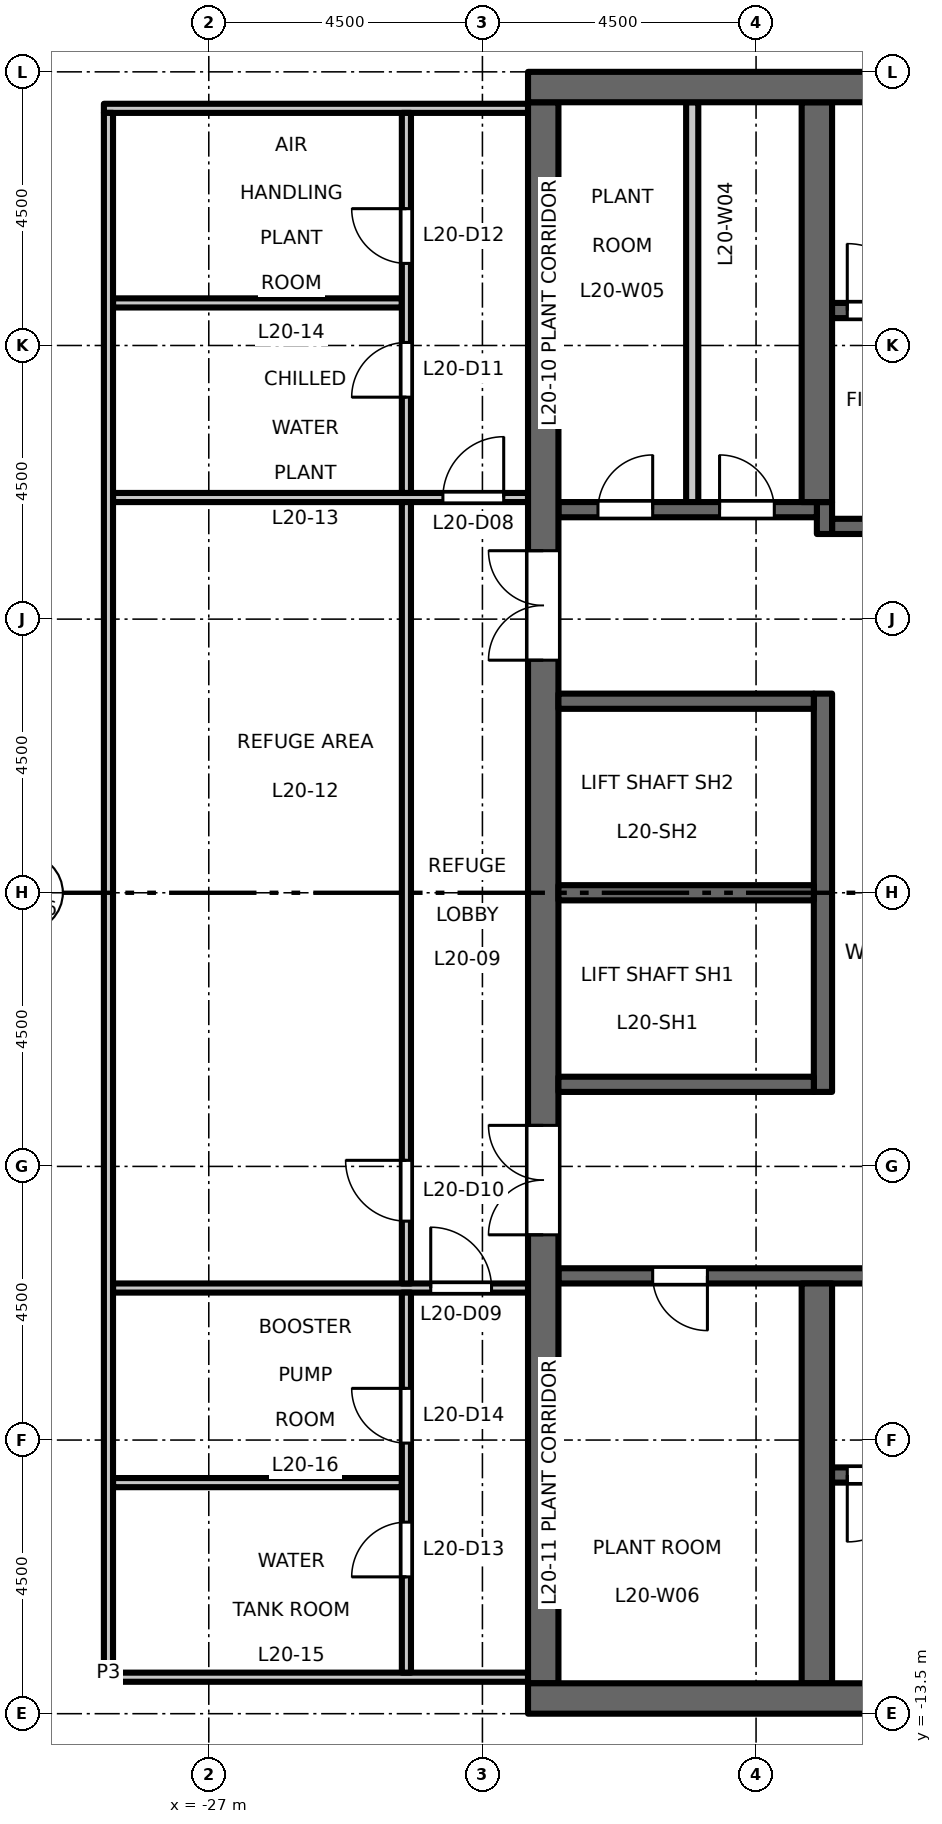
"""IFC4 building model, lengths in metres.
Left out: names, types, materials, properties, quantities, classifications, styles, units other than length and angle.
Written with IfcOpenShell. Run it as: python <this file> out.ifc"""

import sys

from ifc_helpers import new_model, si_unit, direction, frame, frame_2d, origin, place, context, subcontext, project, spatial, rectangle, extrude, element, fill, save


model = new_model("IFC4")
c1 = context("Model", 3, precision=1e-05, world=origin(), true_north=direction((0.0, 1.0)))
c2 = subcontext(c1, "Body", "Model", "MODEL_VIEW")
j1 = project(units=[si_unit("LENGTHUNIT", "METRE"), si_unit("PLANEANGLEUNIT", "RADIAN")], contexts=[c1])
p1 = place(None, origin())
s1 = spatial("IfcSite", under=j1, at=p1, CompositionType="ELEMENT")
p2 = place(p1, origin())
s2 = spatial("IfcBuilding", under=s1, at=p2, CompositionType="ELEMENT")
p3 = place(p2, frame((0.0, 0.0, 94.2)))
s3 = spatial("IfcBuildingStorey", under=s2, at=p3, CompositionType="ELEMENT", Elevation=94.2)
p4 = place(p3, frame((-12.15, 6.025, 0.0), z_axis=(0.0, 0.0, 1.0), x_axis=(-1.0, 0.0, 0.0)))
e1 = element("IfcWall", 1, at=p4, inside=s3, PredefinedType="SHEAR", context=c2, shape_type="SweptSolid", body=[
    extrude(rectangle(XDim=4.6, YDim=0.25, at=frame_2d((2.3, 0.0))), origin(), (0.0, 0.0, 1.0), 4.8),
])
p5 = place(p4, frame((1.8, 0.0, 0.0)))
e2 = element("IfcOpeningElement", 2, at=p5, cuts=e1, PredefinedType="OPENING", context=c2, shape_type="SweptSolid", body=[
    extrude(rectangle(XDim=1.0, YDim=2.1, at=frame_2d((0.5, 1.05))), frame((0.0, 0.135, 0.0), z_axis=(0.0, -1.0, 0.0), x_axis=(1.0, 0.0, 0.0)), (0.0, 0.0, 1.0), 0.27),
])
p6 = place(p3, frame((-16.875, 5.9, 0.0), z_axis=(0.0, 0.0, 1.0), x_axis=(0.0, 1.0, 0.0)))
e3 = element("IfcWall", 3, at=p6, inside=s3, PredefinedType="SHEAR", context=c2, shape_type="SweptSolid", body=[
    extrude(rectangle(XDim=0.525, YDim=0.25, at=frame_2d((0.263, 0.0))), origin(), (0.0, 0.0, 1.0), 4.8),
])
p7 = place(p3, frame((-17.0, 6.3, 0.0), z_axis=(0.0, 0.0, 1.0), x_axis=(-1.0, 0.0, 0.0)))
e4 = element("IfcWall", 4, at=p7, inside=s3, PredefinedType="SHEAR", context=c2, shape_type="SweptSolid", body=[
    extrude(rectangle(XDim=4.25, YDim=0.25, at=frame_2d((2.125, 0.0))), origin(), (0.0, 0.0, 1.0), 4.8),
])
p8 = place(p7, frame((0.7, 0.0, 0.0)))
e5 = element("IfcOpeningElement", 5, at=p8, cuts=e4, PredefinedType="OPENING", context=c2, shape_type="SweptSolid", body=[
    extrude(rectangle(XDim=0.9, YDim=2.1, at=frame_2d((0.45, 1.05))), frame((0.0, 0.135, 0.0), z_axis=(0.0, -1.0, 0.0), x_axis=(1.0, 0.0, 0.0)), (0.0, 0.0, 1.0), 0.27),
])
p9 = place(p7, frame((2.7, 0.0, 0.0)))
e6 = element("IfcOpeningElement", 6, at=p9, cuts=e4, PredefinedType="OPENING", context=c2, shape_type="SweptSolid", body=[
    extrude(rectangle(XDim=0.9, YDim=2.1, at=frame_2d((0.45, 1.05))), frame((0.0, 0.135, 0.0), z_axis=(0.0, -1.0, 0.0), x_axis=(1.0, 0.0, 0.0)), (0.0, 0.0, 1.0), 0.27),
])
p10 = place(p3, frame((-12.15, -6.3, 0.0), z_axis=(0.0, 0.0, 1.0), x_axis=(-1.0, 0.0, 0.0)))
e7 = element("IfcWall", 7, at=p10, inside=s3, PredefinedType="SHEAR", context=c2, shape_type="SweptSolid", body=[
    extrude(rectangle(XDim=9.1, YDim=0.25, at=frame_2d((4.55, 0.0))), origin(), (0.0, 0.0, 1.0), 4.8),
])
p11 = place(p10, frame((1.8, 0.0, 0.0)))
e8 = element("IfcOpeningElement", 8, at=p11, cuts=e7, PredefinedType="OPENING", context=c2, shape_type="SweptSolid", body=[
    extrude(rectangle(XDim=1.0, YDim=2.1, at=frame_2d((0.5, 1.05))), frame((0.0, 0.135, 0.0), z_axis=(0.0, -1.0, 0.0), x_axis=(1.0, 0.0, 0.0)), (0.0, 0.0, 1.0), 0.27),
])
p12 = place(p10, frame((6.65, 0.0, 0.0)))
e9 = element("IfcOpeningElement", 9, at=p12, cuts=e7, PredefinedType="OPENING", context=c2, shape_type="SweptSolid", body=[
    extrude(rectangle(XDim=0.9, YDim=2.1, at=frame_2d((0.45, 1.05))), frame((0.0, 0.135, 0.0), z_axis=(0.0, -1.0, 0.0), x_axis=(1.0, 0.0, 0.0)), (0.0, 0.0, 1.0), 0.27),
])
p13 = place(p3, frame((-21.5, -13.0, 0.0), z_axis=(0.0, 0.0, 1.0), x_axis=(0.0, 1.0, 0.0)))
e10 = element("IfcWall", 10, at=p13, inside=s3, PredefinedType="SHEAR", context=c2, shape_type="SweptSolid", body=[
    extrude(rectangle(XDim=26.0, YDim=0.5, at=frame_2d((13.0, 0.0))), origin(), (0.0, 0.0, 1.0), 4.8),
])
p14 = place(p13, frame((16.825, 0.0, 0.0)))
e11 = element("IfcOpeningElement", 11, at=p14, cuts=e10, PredefinedType="OPENING", context=c2, shape_type="SweptSolid", body=[
    extrude(rectangle(XDim=1.8, YDim=2.1, at=frame_2d((0.9, 1.05))), frame((0.0, 0.26, 0.0), z_axis=(0.0, -1.0, 0.0), x_axis=(1.0, 0.0, 0.0)), (0.0, 0.0, 1.0), 0.52),
])
p15 = place(p13, frame((7.375, 0.0, 0.0)))
e12 = element("IfcOpeningElement", 12, at=p15, cuts=e10, PredefinedType="OPENING", context=c2, shape_type="SweptSolid", body=[
    extrude(rectangle(XDim=1.8, YDim=2.1, at=frame_2d((0.9, 1.05))), frame((0.0, 0.26, 0.0), z_axis=(0.0, -1.0, 0.0), x_axis=(1.0, 0.0, 0.0)), (0.0, 0.0, 1.0), 0.52),
])
p16 = place(p3, frame((-19.05, 6.425, 0.0), z_axis=(0.0, 0.0, 1.0), x_axis=(0.0, 1.0, 0.0)))
e13 = element("IfcWall", 13, at=p16, inside=s3, PredefinedType="PARTITIONING", context=c2, shape_type="SweptSolid", body=[
    extrude(rectangle(XDim=6.575, YDim=0.2, at=frame_2d((3.288, 0.0))), origin(), (0.0, 0.0, 1.0), 4.8),
])
p17 = place(p3, frame((-16.9, -3.275, 0.0), z_axis=(0.0, 0.0, 1.0), x_axis=(0.0, 1.0, 0.0)))
e14 = element("IfcWall", 14, at=p17, inside=s3, PredefinedType="SHEAR", context=c2, shape_type="SweptSolid", body=[
    extrude(rectangle(XDim=6.55, YDim=0.3, at=frame_2d((3.275, 0.0))), origin(), (0.0, 0.0, 1.0), 4.8),
])
for number, where, z_axis, x_axis in (
    (15, (-17.05, 0.0, 0.0), (0.0, 0.0, 1.0), (-1.0, 0.0, 0.0)),
    (16, (-17.05, 3.15, 0.0), (0.0, 0.0, 1.0), (-1.0, 0.0, 0.0)),
    (17, (-17.05, -3.15, 0.0), (0.0, 0.0, 1.0), (-1.0, 0.0, 0.0)),
):
    element("IfcWall", number, at=place(p3, frame(where, z_axis=z_axis, x_axis=x_axis)), inside=s3, PredefinedType="SHEAR", context=c2, shape_type="SweptSolid", body=[
        extrude(rectangle(XDim=4.2, YDim=0.25, at=frame_2d((2.1, 0.0))), origin(), (0.0, 0.0, 1.0), 4.8),
    ])
for number, where, z_axis, x_axis in (
    (18, (-17.0, 6.425, 0.0), (0.0, 0.0, 1.0), (0.0, 1.0, 0.0)),
    (19, (-17.0, -13.0, 0.0), (0.0, 0.0, 1.0), (0.0, 1.0, 0.0)),
):
    element("IfcWall", number, at=place(p3, frame(where, z_axis=z_axis, x_axis=x_axis)), inside=s3, PredefinedType="SHEAR", context=c2, shape_type="SweptSolid", body=[
        extrude(rectangle(XDim=6.575, YDim=0.5, at=frame_2d((3.288, 0.0))), origin(), (0.0, 0.0, 1.0), 4.8),
    ])
p18 = place(p3, frame((-8.75, 9.575, 0.0), z_axis=(0.0, 0.0, 1.0), x_axis=(-1.0, 0.0, 0.0)))
e20 = element("IfcWall", 20, at=p18, inside=s3, PredefinedType="SHEAR", context=c2, shape_type="SweptSolid", body=[
    extrude(rectangle(XDim=8.0, YDim=0.25, at=frame_2d((4.0, 0.0))), origin(), (0.0, 0.0, 1.0), 4.8),
])
p19 = place(p18, frame((6.65, 0.0, 0.0)))
e21 = element("IfcOpeningElement", 21, at=p19, cuts=e20, PredefinedType="OPENING", context=c2, shape_type="SweptSolid", body=[
    extrude(rectangle(XDim=1.1, YDim=2.1, at=frame_2d((0.55, 1.05))), frame((0.0, 0.135, 0.0), z_axis=(0.0, -1.0, 0.0), x_axis=(1.0, 0.0, 0.0)), (0.0, 0.0, 1.0), 0.27),
])
p20 = place(p3, frame((-8.75, -9.575, 0.0), z_axis=(0.0, 0.0, 1.0), x_axis=(-1.0, 0.0, 0.0)))
e22 = element("IfcWall", 22, at=p20, inside=s3, PredefinedType="SHEAR", context=c2, shape_type="SweptSolid", body=[
    extrude(rectangle(XDim=8.0, YDim=0.25, at=frame_2d((4.0, 0.0))), origin(), (0.0, 0.0, 1.0), 4.8),
])
p21 = place(p20, frame((6.65, 0.0, 0.0)))
e23 = element("IfcOpeningElement", 23, at=p21, cuts=e22, PredefinedType="OPENING", context=c2, shape_type="SweptSolid", body=[
    extrude(rectangle(XDim=1.1, YDim=2.1, at=frame_2d((0.55, 1.05))), frame((0.0, 0.135, 0.0), z_axis=(0.0, -1.0, 0.0), x_axis=(1.0, 0.0, 0.0)), (0.0, 0.0, 1.0), 0.27),
])
for number, where, z_axis, x_axis in (
    (24, (-8.25, 13.25, 0.0), (0.0, 0.0, 1.0), (-1.0, 0.0, 0.0)),
    (25, (-8.25, -13.25, 0.0), (0.0, 0.0, 1.0), (-1.0, 0.0, 0.0)),
):
    element("IfcWall", number, at=place(p3, frame(where, z_axis=z_axis, x_axis=x_axis)), inside=s3, PredefinedType="SHEAR", context=c2, shape_type="SweptSolid", body=[
        extrude(rectangle(XDim=13.5, YDim=0.5, at=frame_2d((6.75, 0.0))), origin(), (0.0, 0.0, 1.0), 4.8),
    ])
p22 = place(p3, frame((-28.725, -12.9, 0.0), z_axis=(0.0, 0.0, 1.0), x_axis=(1.0, 0.0, 0.0)))
e26 = element("IfcWall", 26, at=p22, inside=s3, PredefinedType="PARTITIONING", context=c2, shape_type="SweptSolid", body=[
    extrude(rectangle(XDim=6.975, YDim=0.15, at=frame_2d((3.488, 0.0))), origin(), (0.0, 0.0, 1.0), 4.8),
])
p23 = place(p3, frame((-28.575, -9.7, 0.0), z_axis=(0.0, 0.0, 1.0), x_axis=(1.0, 0.0, 0.0)))
e27 = element("IfcWall", 27, at=p23, inside=s3, PredefinedType="PARTITIONING", context=c2, shape_type="SweptSolid", body=[
    extrude(rectangle(XDim=4.75, YDim=0.15, at=frame_2d((2.375, 0.0))), origin(), (0.0, 0.0, 1.0), 4.8),
])
p24 = place(p3, frame((-28.575, -6.5, 0.0), z_axis=(0.0, 0.0, 1.0), x_axis=(1.0, 0.0, 0.0)))
e28 = element("IfcWall", 28, at=p24, inside=s3, PredefinedType="PARTITIONING", context=c2, shape_type="SweptSolid", body=[
    extrude(rectangle(XDim=6.825, YDim=0.15, at=frame_2d((3.413, 0.0))), origin(), (0.0, 0.0, 1.0), 4.8),
])
p25 = place(p24, frame((5.225, 0.0, 0.0)))
e29 = element("IfcOpeningElement", 29, at=p25, cuts=e28, PredefinedType="OPENING", context=c2, shape_type="SweptSolid", body=[
    extrude(rectangle(XDim=1.0, YDim=2.1, at=frame_2d((0.5, 1.05))), frame((0.0, 0.085, 0.0), z_axis=(0.0, -1.0, 0.0), x_axis=(1.0, 0.0, 0.0)), (0.0, 0.0, 1.0), 0.17),
])
p26 = place(p3, frame((-28.575, 6.5, 0.0), z_axis=(0.0, 0.0, 1.0), x_axis=(1.0, 0.0, 0.0)))
e30 = element("IfcWall", 30, at=p26, inside=s3, PredefinedType="PARTITIONING", context=c2, shape_type="SweptSolid", body=[
    extrude(rectangle(XDim=6.825, YDim=0.15, at=frame_2d((3.413, 0.0))), origin(), (0.0, 0.0, 1.0), 4.8),
])
p27 = place(p26, frame((5.425, 0.0, 0.0)))
e31 = element("IfcOpeningElement", 31, at=p27, cuts=e30, PredefinedType="OPENING", context=c2, shape_type="SweptSolid", body=[
    extrude(rectangle(XDim=1.0, YDim=2.1, at=frame_2d((0.5, 1.05))), frame((0.0, 0.085, 0.0), z_axis=(0.0, -1.0, 0.0), x_axis=(1.0, 0.0, 0.0)), (0.0, 0.0, 1.0), 0.17),
])
p28 = place(p3, frame((-28.575, 9.7, 0.0), z_axis=(0.0, 0.0, 1.0), x_axis=(1.0, 0.0, 0.0)))
e32 = element("IfcWall", 32, at=p28, inside=s3, PredefinedType="PARTITIONING", context=c2, shape_type="SweptSolid", body=[
    extrude(rectangle(XDim=4.75, YDim=0.15, at=frame_2d((2.375, 0.0))), origin(), (0.0, 0.0, 1.0), 4.8),
])
p29 = place(p3, frame((-28.725, 12.9, 0.0), z_axis=(0.0, 0.0, 1.0), x_axis=(1.0, 0.0, 0.0)))
e33 = element("IfcWall", 33, at=p29, inside=s3, PredefinedType="PARTITIONING", context=c2, shape_type="SweptSolid", body=[
    extrude(rectangle(XDim=6.975, YDim=0.15, at=frame_2d((3.488, 0.0))), origin(), (0.0, 0.0, 1.0), 4.8),
])
p30 = place(p3, frame((-28.65, -12.825, 0.0), z_axis=(0.0, 0.0, 1.0), x_axis=(0.0, 1.0, 0.0)))
e34 = element("IfcWall", 34, at=p30, inside=s3, PredefinedType="PARTITIONING", context=c2, shape_type="SweptSolid", body=[
    extrude(rectangle(XDim=25.65, YDim=0.15, at=frame_2d((12.825, 0.0))), origin(), (0.0, 0.0, 1.0), 4.8),
])
p31 = place(p3, frame((-23.75, -12.825, 0.0), z_axis=(0.0, 0.0, 1.0), x_axis=(0.0, 1.0, 0.0)))
e35 = element("IfcWall", 35, at=p31, inside=s3, PredefinedType="PARTITIONING", context=c2, shape_type="SweptSolid", body=[
    extrude(rectangle(XDim=6.25, YDim=0.15, at=frame_2d((3.125, 0.0))), origin(), (0.0, 0.0, 1.0), 4.8),
])
p32 = place(p31, frame((1.575, 0.0, 0.0)))
e36 = element("IfcOpeningElement", 36, at=p32, cuts=e35, PredefinedType="OPENING", context=c2, shape_type="SweptSolid", body=[
    extrude(rectangle(XDim=0.9, YDim=2.1, at=frame_2d((0.45, 1.05))), frame((0.0, 0.085, 0.0), z_axis=(0.0, -1.0, 0.0), x_axis=(1.0, 0.0, 0.0)), (0.0, 0.0, 1.0), 0.17),
])
p33 = place(p31, frame((3.775, 0.0, 0.0)))
e37 = element("IfcOpeningElement", 37, at=p33, cuts=e35, PredefinedType="OPENING", context=c2, shape_type="SweptSolid", body=[
    extrude(rectangle(XDim=0.9, YDim=2.1, at=frame_2d((0.45, 1.05))), frame((0.0, 0.085, 0.0), z_axis=(0.0, -1.0, 0.0), x_axis=(1.0, 0.0, 0.0)), (0.0, 0.0, 1.0), 0.17),
])
p34 = place(p3, frame((-23.75, -6.425, 0.0), z_axis=(0.0, 0.0, 1.0), x_axis=(0.0, 1.0, 0.0)))
e38 = element("IfcWall", 38, at=p34, inside=s3, PredefinedType="PARTITIONING", context=c2, shape_type="SweptSolid", body=[
    extrude(rectangle(XDim=12.85, YDim=0.15, at=frame_2d((6.425, 0.0))), origin(), (0.0, 0.0, 1.0), 4.8),
])
p35 = place(p34, frame((1.025, 0.0, 0.0)))
e39 = element("IfcOpeningElement", 39, at=p35, cuts=e38, PredefinedType="OPENING", context=c2, shape_type="SweptSolid", body=[
    extrude(rectangle(XDim=1.0, YDim=2.1, at=frame_2d((0.5, 1.05))), frame((0.0, 0.085, 0.0), z_axis=(0.0, -1.0, 0.0), x_axis=(1.0, 0.0, 0.0)), (0.0, 0.0, 1.0), 0.17),
])
p36 = place(p3, frame((-23.75, 6.575, 0.0), z_axis=(0.0, 0.0, 1.0), x_axis=(0.0, 1.0, 0.0)))
e40 = element("IfcWall", 40, at=p36, inside=s3, PredefinedType="PARTITIONING", context=c2, shape_type="SweptSolid", body=[
    extrude(rectangle(XDim=6.25, YDim=0.15, at=frame_2d((3.125, 0.0))), origin(), (0.0, 0.0, 1.0), 4.8),
])
p37 = place(p36, frame((1.575, 0.0, 0.0)))
e41 = element("IfcOpeningElement", 41, at=p37, cuts=e40, PredefinedType="OPENING", context=c2, shape_type="SweptSolid", body=[
    extrude(rectangle(XDim=0.9, YDim=2.1, at=frame_2d((0.45, 1.05))), frame((0.0, 0.085, 0.0), z_axis=(0.0, -1.0, 0.0), x_axis=(1.0, 0.0, 0.0)), (0.0, 0.0, 1.0), 0.17),
])
p38 = place(p36, frame((3.775, 0.0, 0.0)))
e42 = element("IfcOpeningElement", 42, at=p38, cuts=e40, PredefinedType="OPENING", context=c2, shape_type="SweptSolid", body=[
    extrude(rectangle(XDim=0.9, YDim=2.1, at=frame_2d((0.45, 1.05))), frame((0.0, 0.085, 0.0), z_axis=(0.0, -1.0, 0.0), x_axis=(1.0, 0.0, 0.0)), (0.0, 0.0, 1.0), 0.17),
])
p39 = place(p19, origin())
e43 = element("IfcDoor", 43, at=p39, inside=s3, OperationType="SINGLE_SWING_RIGHT", PredefinedType="DOOR", context=c2, shape_type="SweptSolid", body=[
    extrude(rectangle(XDim=1.1, YDim=2.1, at=frame_2d((0.55, 1.05))), frame((0.0, 0.025, 0.0), z_axis=(0.0, -1.0, 0.0), x_axis=(1.0, 0.0, 0.0)), (0.0, 0.0, 1.0), 0.05),
])
fill(e21, e43)
p40 = place(p21, origin())
e44 = element("IfcDoor", 44, at=p40, inside=s3, OperationType="SINGLE_SWING_LEFT", PredefinedType="DOOR", context=c2, shape_type="SweptSolid", body=[
    extrude(rectangle(XDim=1.1, YDim=2.1, at=frame_2d((0.55, 1.05))), frame((0.0, 0.025, 0.0), z_axis=(0.0, -1.0, 0.0), x_axis=(1.0, 0.0, 0.0)), (0.0, 0.0, 1.0), 0.05),
])
fill(e23, e44)
p41 = place(p14, origin())
e45 = element("IfcDoor", 45, at=p41, inside=s3, OperationType="DOUBLE_DOOR_DOUBLE_SWING", PredefinedType="DOOR", context=c2, shape_type="SweptSolid", body=[
    extrude(rectangle(XDim=1.8, YDim=2.1, at=frame_2d((0.9, 1.05))), frame((0.0, 0.025, 0.0), z_axis=(0.0, -1.0, 0.0), x_axis=(1.0, 0.0, 0.0)), (0.0, 0.0, 1.0), 0.05),
])
fill(e11, e45)
p42 = place(p15, origin())
e46 = element("IfcDoor", 46, at=p42, inside=s3, OperationType="DOUBLE_DOOR_DOUBLE_SWING", PredefinedType="DOOR", context=c2, shape_type="SweptSolid", body=[
    extrude(rectangle(XDim=1.8, YDim=2.1, at=frame_2d((0.9, 1.05))), frame((0.0, 0.025, 0.0), z_axis=(0.0, -1.0, 0.0), x_axis=(1.0, 0.0, 0.0)), (0.0, 0.0, 1.0), 0.05),
])
fill(e12, e46)
p43 = place(p8, origin())
e47 = element("IfcDoor", 47, at=p43, inside=s3, OperationType="SINGLE_SWING_RIGHT", PredefinedType="DOOR", context=c2, shape_type="SweptSolid", body=[
    extrude(rectangle(XDim=0.9, YDim=2.1, at=frame_2d((0.45, 1.05))), frame((0.0, 0.025, 0.0), z_axis=(0.0, -1.0, 0.0), x_axis=(1.0, 0.0, 0.0)), (0.0, 0.0, 1.0), 0.05),
])
fill(e5, e47)
p44 = place(p9, origin())
e48 = element("IfcDoor", 48, at=p44, inside=s3, OperationType="SINGLE_SWING_LEFT", PredefinedType="DOOR", context=c2, shape_type="SweptSolid", body=[
    extrude(rectangle(XDim=0.9, YDim=2.1, at=frame_2d((0.45, 1.05))), frame((0.0, 0.025, 0.0), z_axis=(0.0, -1.0, 0.0), x_axis=(1.0, 0.0, 0.0)), (0.0, 0.0, 1.0), 0.05),
])
fill(e6, e48)
p45 = place(p12, origin())
e49 = element("IfcDoor", 49, at=p45, inside=s3, OperationType="SINGLE_SWING_RIGHT", PredefinedType="DOOR", context=c2, shape_type="SweptSolid", body=[
    extrude(rectangle(XDim=0.9, YDim=2.1, at=frame_2d((0.45, 1.05))), frame((0.0, 0.025, 0.0), z_axis=(0.0, -1.0, 0.0), x_axis=(1.0, 0.0, 0.0)), (0.0, 0.0, 1.0), 0.05),
])
fill(e9, e49)
p46 = place(p27, origin())
e50 = element("IfcDoor", 50, at=p46, inside=s3, OperationType="SINGLE_SWING_RIGHT", PredefinedType="DOOR", context=c2, shape_type="SweptSolid", body=[
    extrude(rectangle(XDim=1.0, YDim=2.1, at=frame_2d((0.5, 1.05))), frame((0.0, 0.025, 0.0), z_axis=(0.0, -1.0, 0.0), x_axis=(1.0, 0.0, 0.0)), (0.0, 0.0, 1.0), 0.05),
])
fill(e31, e50)
p47 = place(p25, origin())
e51 = element("IfcDoor", 51, at=p47, inside=s3, OperationType="SINGLE_SWING_LEFT", PredefinedType="DOOR", context=c2, shape_type="SweptSolid", body=[
    extrude(rectangle(XDim=1.0, YDim=2.1, at=frame_2d((0.5, 1.05))), frame((0.0, 0.025, 0.0), z_axis=(0.0, -1.0, 0.0), x_axis=(1.0, 0.0, 0.0)), (0.0, 0.0, 1.0), 0.05),
])
fill(e29, e51)
p48 = place(p35, origin())
e52 = element("IfcDoor", 52, at=p48, inside=s3, OperationType="SINGLE_SWING_RIGHT", PredefinedType="DOOR", context=c2, shape_type="SweptSolid", body=[
    extrude(rectangle(XDim=1.0, YDim=2.1, at=frame_2d((0.5, 1.05))), frame((0.0, 0.025, 0.0), z_axis=(0.0, -1.0, 0.0), x_axis=(1.0, 0.0, 0.0)), (0.0, 0.0, 1.0), 0.05),
])
fill(e39, e52)
p49 = place(p37, origin())
e53 = element("IfcDoor", 53, at=p49, inside=s3, OperationType="SINGLE_SWING_LEFT", PredefinedType="DOOR", context=c2, shape_type="SweptSolid", body=[
    extrude(rectangle(XDim=0.9, YDim=2.1, at=frame_2d((0.45, 1.05))), frame((0.0, 0.025, 0.0), z_axis=(0.0, -1.0, 0.0), x_axis=(1.0, 0.0, 0.0)), (0.0, 0.0, 1.0), 0.05),
])
fill(e41, e53)
p50 = place(p38, origin())
e54 = element("IfcDoor", 54, at=p50, inside=s3, OperationType="SINGLE_SWING_RIGHT", PredefinedType="DOOR", context=c2, shape_type="SweptSolid", body=[
    extrude(rectangle(XDim=0.9, YDim=2.1, at=frame_2d((0.45, 1.05))), frame((0.0, 0.025, 0.0), z_axis=(0.0, -1.0, 0.0), x_axis=(1.0, 0.0, 0.0)), (0.0, 0.0, 1.0), 0.05),
])
fill(e42, e54)
p51 = place(p32, origin())
e55 = element("IfcDoor", 55, at=p51, inside=s3, OperationType="SINGLE_SWING_LEFT", PredefinedType="DOOR", context=c2, shape_type="SweptSolid", body=[
    extrude(rectangle(XDim=0.9, YDim=2.1, at=frame_2d((0.45, 1.05))), frame((0.0, 0.025, 0.0), z_axis=(0.0, -1.0, 0.0), x_axis=(1.0, 0.0, 0.0)), (0.0, 0.0, 1.0), 0.05),
])
fill(e36, e55)
p52 = place(p33, origin())
e56 = element("IfcDoor", 56, at=p52, inside=s3, OperationType="SINGLE_SWING_RIGHT", PredefinedType="DOOR", context=c2, shape_type="SweptSolid", body=[
    extrude(rectangle(XDim=0.9, YDim=2.1, at=frame_2d((0.45, 1.05))), frame((0.0, 0.025, 0.0), z_axis=(0.0, -1.0, 0.0), x_axis=(1.0, 0.0, 0.0)), (0.0, 0.0, 1.0), 0.05),
])
fill(e37, e56)
save(model, sys.argv[1])
